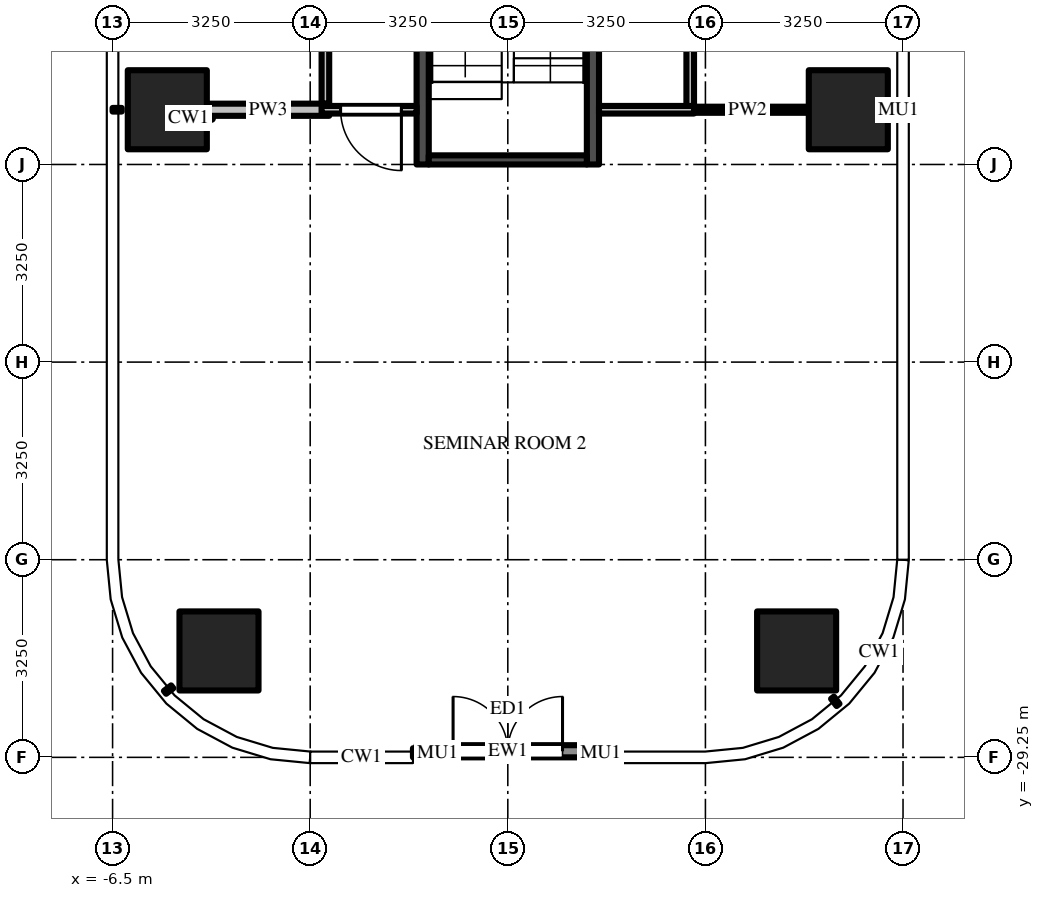
"""IFC4 building model, lengths in metres.
Left out: names, types, materials, properties, quantities, classifications, styles, units other than length and angle.
Written with IfcOpenShell. Run it as: python <this file> out.ifc"""

import sys

from ifc_helpers import new_model, si_unit, direction, frame, frame_2d, origin, origin_2d, place, context, subcontext, project, spatial, rectangle, extrude, source, transform, mapped, element, fill, save


model = new_model("IFC4")
c1 = context("Model", 3, precision=1e-05, world=origin(), true_north=direction((0.0, 1.0)))
c2 = subcontext(c1, "Body", "Model", "MODEL_VIEW")
j1 = project(units=[si_unit("LENGTHUNIT", "METRE"), si_unit("PLANEANGLEUNIT", "RADIAN")], contexts=[c1])
p1 = place(None, origin())
s1 = spatial("IfcSite", under=j1, at=p1, CompositionType="ELEMENT")
p2 = place(p1, origin())
s2 = spatial("IfcBuilding", under=s1, at=p2, CompositionType="ELEMENT")
p3 = place(p2, frame((0.0, 0.0, 102.0)))
s3 = spatial("IfcBuildingStorey", under=s2, at=p3, CompositionType="ELEMENT", Elevation=102.0)
m1 = source(origin(), c2, "Body", "SweptSolid", [
    extrude(rectangle(XDim=1.3, YDim=1.3, at=origin_2d()), origin(), (0.0, 0.0, 1.0), 4.5),
])
for number, where, z_axis, x_axis in (
    (1, (5.6, -18.6, 0.0), (0.0, 0.0, 1.0), (1.0, 0.0, 0.0)),
    (2, (4.75, -27.5, 0.0), (0.0, 0.0, 1.0), (1.0, 0.0, 0.0)),
    (3, (-5.6, -18.6, 0.0), (0.0, 0.0, 1.0), (1.0, 0.0, 0.0)),
    (4, (-4.75, -27.5, 0.0), (0.0, 0.0, 1.0), (1.0, 0.0, 0.0)),
):
    element("IfcColumn", number, at=place(p3, frame(where, z_axis=z_axis, x_axis=x_axis)), inside=s3, PredefinedType="COLUMN", context=c2, shape_type="MappedRepresentation", body=[
        mapped(m1, transform((0.0, 0.0, 0.0))),
    ])
m2 = source(origin(), c2, "Body", "SweptSolid", [
    extrude(rectangle(XDim=6.0, YDim=0.2, at=frame_2d((3.0, 0.0))), origin(), (0.0, 0.0, 1.0), 4.25),
])
for number, where, z_axis, x_axis in (
    (5, (1.4, -13.5, 0.0), (0.0, 0.0, 1.0), (0.0, -1.0, 0.0)),
    (6, (-1.4, -13.5, 0.0), (0.0, 0.0, 1.0), (0.0, -1.0, 0.0)),
):
    element("IfcWall", number, at=place(p3, frame(where, z_axis=z_axis, x_axis=x_axis)), inside=s3, PredefinedType="SHEAR", context=c2, shape_type="MappedRepresentation", body=[
        mapped(m2, transform((0.0, 0.0, 0.0))),
    ])
m3 = source(origin(), c2, "Body", "SweptSolid", [
    extrude(rectangle(XDim=2.6, YDim=0.15, at=frame_2d((1.3, 0.0))), origin(), (0.0, 0.0, 1.0), 4.25),
])
p4 = place(p3, frame((1.3, -19.425, 0.0), z_axis=(0.0, 0.0, 1.0), x_axis=(-1.0, 0.0, 0.0)))
e7 = element("IfcWall", 7, at=p4, inside=s3, PredefinedType="SHEAR", context=c2, shape_type="MappedRepresentation", body=[
    mapped(m3, transform((0.0, 0.0, 0.0))),
])
m4 = source(origin(), c2, "Body", "SweptSolid", [
    extrude(rectangle(XDim=3.0, YDim=0.2, at=frame_2d((1.5, 0.0))), origin(), (0.0, 0.0, 1.0), 4.25),
])
p5 = place(p3, frame((-1.5, -29.15, 0.0), z_axis=(0.0, 0.0, 1.0), x_axis=(1.0, 0.0, 0.0)))
e8 = element("IfcWall", 8, at=p5, inside=s3, PredefinedType="SOLIDWALL", context=c2, shape_type="MappedRepresentation", body=[
    mapped(m4, transform((0.0, 0.0, 0.0))),
])
m5 = source(origin(), c2, "Body", "SweptSolid", [
    extrude(rectangle(XDim=1.8, YDim=2.4, at=frame_2d((0.9, 1.2))), frame((0.0, 0.11, 0.0), z_axis=(0.0, -1.0, 0.0), x_axis=(1.0, 0.0, 0.0)), (0.0, 0.0, 1.0), 0.22),
])
p6 = place(p5, frame((0.6, 0.0, 0.0)))
e9 = element("IfcOpeningElement", 9, at=p6, cuts=e8, PredefinedType="OPENING", context=c2, shape_type="MappedRepresentation", body=[
    mapped(m5, transform((0.0, 0.0, 0.0))),
])
m6 = source(origin(), c2, "Body", "SweptSolid", [
    extrude(rectangle(XDim=6.4, YDim=0.125, at=frame_2d((3.2, 0.0))), origin(), (0.0, 0.0, 1.0), 3.468),
])
p7 = place(p3, frame((-3.0, -18.5, 0.0), z_axis=(0.0, 0.0, 1.0), x_axis=(0.0, 1.0, 0.0)))
e10 = element("IfcWall", 10, at=p7, inside=s3, PredefinedType="PARTITIONING", context=c2, shape_type="MappedRepresentation", body=[
    mapped(m6, transform((0.0, 0.0, 0.0))),
])
m7 = source(origin(), c2, "Body", "SweptSolid", [
    extrude(rectangle(XDim=6.387, YDim=0.125, at=frame_2d((3.194, 0.0))), origin(), (0.0, 0.0, 1.0), 3.468),
])
p8 = place(p3, frame((3.0, -12.163, 0.0), z_axis=(0.0, 0.0, 1.0), x_axis=(0.0, -1.0, 0.0)))
e11 = element("IfcWall", 11, at=p8, inside=s3, PredefinedType="PARTITIONING", context=c2, shape_type="MappedRepresentation", body=[
    mapped(m7, transform((0.0, 0.0, 0.0))),
])
m8 = source(origin(), c2, "Body", "SweptSolid", [
    extrude(rectangle(XDim=2.012, YDim=0.2, at=frame_2d((1.006, 0.0))), origin(), (0.0, 0.0, 1.0), 3.697),
])
p9 = place(p3, frame((-4.95, -18.6, 0.0), z_axis=(0.0, 0.0, 1.0), x_axis=(1.0, 0.0, 0.0)))
e12 = element("IfcWall", 12, at=p9, inside=s3, PredefinedType="PARTITIONING", context=c2, shape_type="MappedRepresentation", body=[
    mapped(m8, transform((0.0, 0.0, 0.0))),
])
m9 = source(origin(), c2, "Body", "SweptSolid", [
    extrude(rectangle(XDim=2.012, YDim=0.1, at=frame_2d((1.006, 0.0))), origin(), (0.0, 0.0, 1.0), 3.697),
])
p10 = place(p3, frame((2.938, -18.6, 0.0), z_axis=(0.0, 0.0, 1.0), x_axis=(1.0, 0.0, 0.0)))
e13 = element("IfcWall", 13, at=p10, inside=s3, PredefinedType="PARTITIONING", context=c2, shape_type="MappedRepresentation", body=[
    mapped(m9, transform((0.0, 0.0, 0.0))),
])
m10 = source(origin(), c2, "Body", "SweptSolid", [
    extrude(rectangle(XDim=1.562, YDim=0.125, at=frame_2d((0.781, 0.0))), origin(), (0.0, 0.0, 1.0), 3.697),
])
p11 = place(p3, frame((-1.5, -18.6, 0.0), z_axis=(0.0, 0.0, 1.0), x_axis=(-1.0, 0.0, 0.0)))
e14 = element("IfcWall", 14, at=p11, inside=s3, PredefinedType="PARTITIONING", context=c2, shape_type="MappedRepresentation", body=[
    mapped(m10, transform((0.0, 0.0, 0.0))),
])
m11 = source(origin(), c2, "Body", "SweptSolid", [
    extrude(rectangle(XDim=1.0, YDim=2.1, at=frame_2d((0.5, 1.05))), frame((0.0, 0.073, 0.0), z_axis=(0.0, -1.0, 0.0), x_axis=(1.0, 0.0, 0.0)), (0.0, 0.0, 1.0), 0.145),
])
p12 = place(p11, frame((0.25, 0.0, 0.0)))
e15 = element("IfcOpeningElement", 15, at=p12, cuts=e14, PredefinedType="OPENING", context=c2, shape_type="MappedRepresentation", body=[
    mapped(m11, transform((0.0, 0.0, 0.0))),
])
p13 = place(p3, frame((3.062, -18.6, 0.0), z_axis=(0.0, 0.0, 1.0), x_axis=(-1.0, 0.0, 0.0)))
e16 = element("IfcWall", 16, at=p13, inside=s3, PredefinedType="PARTITIONING", context=c2, shape_type="MappedRepresentation", body=[
    mapped(m10, transform((0.0, 0.0, 0.0))),
])
m12 = source(origin(), c2, "Body", "SweptSolid", [
    extrude(rectangle(XDim=1.8, YDim=2.4, at=frame_2d((0.9, 1.2))), frame((0.0, 0.025, 0.0), z_axis=(0.0, -1.0, 0.0), x_axis=(1.0, 0.0, 0.0)), (0.0, 0.0, 1.0), 0.05),
])
p14 = place(p6, origin())
e17 = element("IfcDoor", 17, at=p14, inside=s3, OperationType="DOUBLE_DOOR_SINGLE_SWING", PredefinedType="DOOR", context=c2, shape_type="MappedRepresentation", body=[
    mapped(m12, transform((0.0, 0.0, 0.0))),
])
fill(e9, e17)
m13 = source(origin(), c2, "Body", "SweptSolid", [
    extrude(rectangle(XDim=1.0, YDim=2.1, at=frame_2d((0.5, 1.05))), frame((0.0, 0.025, 0.0), z_axis=(0.0, -1.0, 0.0), x_axis=(1.0, 0.0, 0.0)), (0.0, 0.0, 1.0), 0.05),
])
p15 = place(p12, origin())
e18 = element("IfcDoor", 18, at=p15, inside=s3, OperationType="SINGLE_SWING_LEFT", PredefinedType="DOOR", context=c2, shape_type="MappedRepresentation", body=[
    mapped(m13, transform((0.0, 0.0, 0.0))),
])
fill(e15, e18)
save(model, sys.argv[1])
